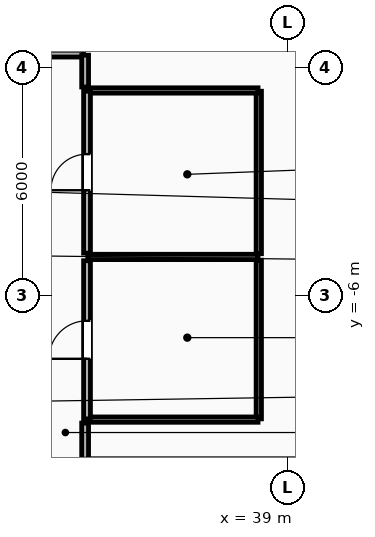
"""IFC4 building model, lengths in metres.
Left out: names, types, materials, properties, quantities, classifications, styles, units other than length and angle.
Written with IfcOpenShell. Run it as: python <this file> out.ifc"""

import sys

from ifc_helpers import new_model, si_unit, direction, frame, frame_2d, origin, place, context, subcontext, project, spatial, rectangle, extrude, element, fill, save


model = new_model("IFC4")
c1 = context("Model", 3, precision=1e-05, world=origin(), true_north=direction((0.0, 1.0)))
c2 = subcontext(c1, "Body", "Model", "MODEL_VIEW")
j1 = project(units=[si_unit("LENGTHUNIT", "METRE"), si_unit("PLANEANGLEUNIT", "RADIAN")], contexts=[c1])
p1 = place(None, origin())
s1 = spatial("IfcSite", under=j1, at=p1, CompositionType="ELEMENT")
p2 = place(p1, origin())
s2 = spatial("IfcBuilding", under=s1, at=p2, CompositionType="ELEMENT")
p3 = place(p2, frame((0.0, 0.0, 180.0)))
s3 = spatial("IfcBuildingStorey", under=s2, at=p3, CompositionType="ELEMENT", Elevation=180.0)
p4 = place(p3, frame((38.24, -9.24, 0.0), z_axis=(0.0, 0.0, 1.0), x_axis=(0.0, 1.0, 0.0)))
e1 = element("IfcWall", 1, at=p4, inside=s3, PredefinedType="PARTITIONING", context=c2, shape_type="SweptSolid", body=[
    extrude(rectangle(XDim=4.175, YDim=0.14, at=frame_2d((2.087, 0.0))), origin(), (0.0, 0.0, 1.0), 3.36),
])
p5 = place(p3, frame((38.24, -4.895, 0.0), z_axis=(0.0, 0.0, 1.0), x_axis=(0.0, 1.0, 0.0)))
e2 = element("IfcWall", 2, at=p5, inside=s3, PredefinedType="PARTITIONING", context=c2, shape_type="SweptSolid", body=[
    extrude(rectangle(XDim=4.275, YDim=0.14, at=frame_2d((2.137, 0.0))), origin(), (0.0, 0.0, 1.0), 3.36),
])
for number, where, z_axis, x_axis in (
    (3, (33.74, -0.6, 0.0), (0.0, 0.0, 1.0), (1.0, 0.0, 0.0)),
    (4, (33.74, -4.98, 0.0), (0.0, 0.0, 1.0), (1.0, 0.0, 0.0)),
    (5, (33.74, -9.26, 0.0), (0.0, 0.0, 1.0), (1.0, 0.0, 0.0)),
):
    element("IfcWall", number, at=place(p3, frame(where, z_axis=z_axis, x_axis=x_axis)), inside=s3, PredefinedType="PARTITIONING", context=c2, shape_type="SweptSolid", body=[
        extrude(rectangle(XDim=4.48, YDim=0.14, at=frame_2d((2.24, 0.0))), origin(), (0.0, 0.0, 1.0), 3.36),
    ])
p6 = place(p3, frame((33.72, -4.88, 0.0), z_axis=(0.0, 0.0, 1.0), x_axis=(0.0, 1.0, 0.0)))
e6 = element("IfcWall", 6, at=p6, inside=s3, PredefinedType="PARTITIONING", context=c2, shape_type="SweptSolid", body=[
    extrude(rectangle(XDim=4.26, YDim=0.18, at=frame_2d((2.13, 0.0))), origin(), (0.0, 0.0, 1.0), 3.36),
])
p7 = place(p6, frame((1.655, 0.0, 0.0)))
e7 = element("IfcOpeningElement", 7, at=p7, cuts=e6, PredefinedType="OPENING", context=c2, shape_type="SweptSolid", body=[
    extrude(rectangle(XDim=0.95, YDim=2.1, at=frame_2d((0.475, 1.05))), frame((0.0, 0.1, 0.0), z_axis=(0.0, -1.0, 0.0), x_axis=(1.0, 0.0, 0.0)), (0.0, 0.0, 1.0), 0.2),
])
p8 = place(p3, frame((33.72, -9.24, 0.0), z_axis=(0.0, 0.0, 1.0), x_axis=(0.0, 1.0, 0.0)))
e8 = element("IfcWall", 8, at=p8, inside=s3, PredefinedType="PARTITIONING", context=c2, shape_type="SweptSolid", body=[
    extrude(rectangle(XDim=4.16, YDim=0.18, at=frame_2d((2.08, 0.0))), origin(), (0.0, 0.0, 1.0), 3.36),
])
p9 = place(p8, frame((1.58, 0.0, 0.0)))
e9 = element("IfcOpeningElement", 9, at=p9, cuts=e8, PredefinedType="OPENING", context=c2, shape_type="SweptSolid", body=[
    extrude(rectangle(XDim=1.0, YDim=2.15, at=frame_2d((0.5, 1.075))), frame((0.0, 0.1, 0.0), z_axis=(0.0, -1.0, 0.0), x_axis=(1.0, 0.0, 0.0)), (0.0, 0.0, 1.0), 0.2),
])
p10 = place(p3, frame((33.628, 0.37, 0.0), z_axis=(0.0, 0.0, 1.0), x_axis=(-1.0, 0.0, 0.0)))
e10 = element("IfcWall", 10, at=p10, inside=s3, PredefinedType="PARTITIONING", context=c2, shape_type="SweptSolid", body=[
    extrude(rectangle(XDim=5.628, YDim=0.18, at=frame_2d((2.814, 0.0))), origin(), (0.0, 0.0, 1.0), 3.36),
])
p11 = place(p3, frame((33.67, -10.3, 0.0), z_axis=(0.0, 0.0, 1.0), x_axis=(0.0, 1.0, 0.0)))
e11 = element("IfcWall", 11, at=p11, inside=s3, PredefinedType="PARTITIONING", context=c2, shape_type="SweptSolid", body=[
    extrude(rectangle(XDim=0.949, YDim=0.18, at=frame_2d((0.474, 0.0))), origin(), (0.0, 0.0, 1.0), 3.36),
])
p12 = place(p3, frame((33.67, -0.509, 0.0), z_axis=(0.0, 0.0, 1.0), x_axis=(0.0, 1.0, 0.0)))
e12 = element("IfcWall", 12, at=p12, inside=s3, PredefinedType="PARTITIONING", context=c2, shape_type="SweptSolid", body=[
    extrude(rectangle(XDim=0.837, YDim=0.18, at=frame_2d((0.418, 0.0))), origin(), (0.0, 0.0, 1.0), 3.36),
])
p13 = place(p7, origin())
e13 = element("IfcDoor", 13, at=p13, inside=s3, OperationType="SINGLE_SWING_LEFT", PredefinedType="DOOR", context=c2, shape_type="SweptSolid", body=[
    extrude(rectangle(XDim=0.95, YDim=2.1, at=frame_2d((0.475, 1.05))), frame((0.0, 0.025, 0.0), z_axis=(0.0, -1.0, 0.0), x_axis=(1.0, 0.0, 0.0)), (0.0, 0.0, 1.0), 0.05),
])
fill(e7, e13)
p14 = place(p9, origin())
e14 = element("IfcDoor", 14, at=p14, inside=s3, OperationType="SINGLE_SWING_LEFT", PredefinedType="DOOR", context=c2, shape_type="SweptSolid", body=[
    extrude(rectangle(XDim=1.0, YDim=2.15, at=frame_2d((0.5, 1.075))), frame((0.0, 0.025, 0.0), z_axis=(0.0, -1.0, 0.0), x_axis=(1.0, 0.0, 0.0)), (0.0, 0.0, 1.0), 0.05),
])
fill(e9, e14)
save(model, sys.argv[1])
